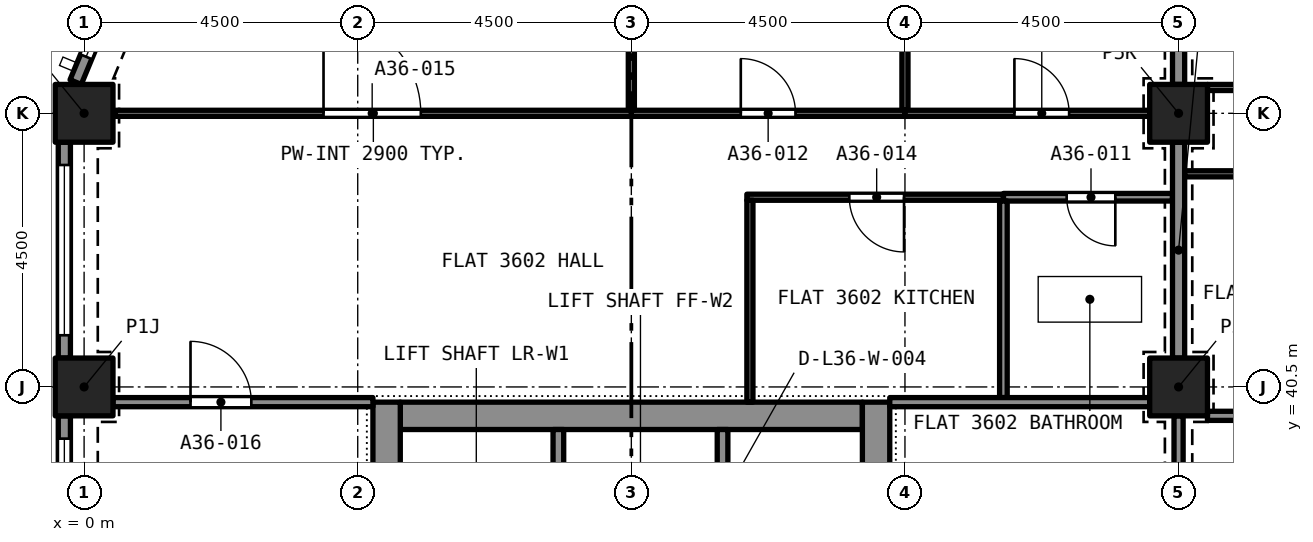
"""IFC4 building model, lengths in metres.
Left out: names, types, materials, properties, quantities, classifications, styles, units other than length and angle.
Written with IfcOpenShell. Run it as: python <this file> out.ifc"""

import sys

from ifc_helpers import new_model, si_unit, direction, frame, frame_2d, origin, origin_2d, place, context, subcontext, project, spatial, rectangle, extrude, element, fill, save


model = new_model("IFC4")
c1 = context("Model", 3, precision=1e-05, world=origin(), true_north=direction((0.0, 1.0)))
c2 = subcontext(c1, "Body", "Model", "MODEL_VIEW")
j1 = project(units=[si_unit("LENGTHUNIT", "METRE"), si_unit("PLANEANGLEUNIT", "RADIAN")], contexts=[c1])
p1 = place(None, origin())
s1 = spatial("IfcSite", under=j1, at=p1, CompositionType="ELEMENT")
p2 = place(p1, origin())
s2 = spatial("IfcBuilding", under=s1, at=p2, CompositionType="ELEMENT")
p3 = place(p2, frame((0.0, 0.0, 130.2)))
s3 = spatial("IfcBuildingStorey", under=s2, at=p3, CompositionType="ELEMENT", Elevation=130.2)
for number, where, z_axis, x_axis in (
    (1, (0.0, 40.5, 0.0), (0.0, 0.0, 1.0), (1.0, 0.0, 0.0)),
    (2, (18.0, 40.5, 0.0), (0.0, 0.0, 1.0), (1.0, 0.0, 0.0)),
    (3, (0.0, 45.0, 0.0), (0.0, 0.0, 1.0), (1.0, 0.0, 0.0)),
    (4, (18.0, 45.0, 0.0), (0.0, 0.0, 1.0), (1.0, 0.0, 0.0)),
):
    element("IfcColumn", number, at=place(p3, frame(where, z_axis=z_axis, x_axis=x_axis)), inside=s3, PredefinedType="COLUMN", context=c2, shape_type="SweptSolid", body=[
        extrude(rectangle(XDim=0.95, YDim=0.95, at=origin_2d()), origin(), (0.0, 0.0, 1.0), 3.2),
    ])
p4 = place(p3, frame((5.2, 40.025, 0.0), z_axis=(0.0, 0.0, 1.0), x_axis=(1.0, 0.0, 0.0)))
e5 = element("IfcWall", 5, at=p4, inside=s3, PredefinedType="SOLIDWALL", context=c2, shape_type="SweptSolid", body=[
    extrude(rectangle(XDim=7.6, YDim=0.45, at=frame_2d((3.8, 0.0))), origin(), (0.0, 0.0, 1.0), 3.2),
])
p5 = place(p3, frame((4.975, 27.25, 0.0), z_axis=(0.0, 0.0, 1.0), x_axis=(0.0, 1.0, 0.0)))
e6 = element("IfcWall", 6, at=p5, inside=s3, PredefinedType="SOLIDWALL", context=c2, shape_type="SweptSolid", body=[
    extrude(rectangle(XDim=13.0, YDim=0.45, at=frame_2d((6.5, 0.0))), origin(), (0.0, 0.0, 1.0), 3.2),
])
p6 = place(p5, frame((8.7, 0.0, 0.0)))
e7 = element("IfcOpeningElement", 7, at=p6, cuts=e6, PredefinedType="OPENING", context=c2, shape_type="SweptSolid", body=[
    extrude(rectangle(XDim=1.2, YDim=2.1, at=frame_2d((0.6, 1.05))), frame((0.0, 0.235, 0.0), z_axis=(0.0, -1.0, 0.0), x_axis=(1.0, 0.0, 0.0)), (0.0, 0.0, 1.0), 0.47),
])
p7 = place(p3, frame((13.025, 27.25, 0.0), z_axis=(0.0, 0.0, 1.0), x_axis=(0.0, 1.0, 0.0)))
e8 = element("IfcWall", 8, at=p7, inside=s3, PredefinedType="SOLIDWALL", context=c2, shape_type="SweptSolid", body=[
    extrude(rectangle(XDim=13.0, YDim=0.45, at=frame_2d((6.5, 0.0))), origin(), (0.0, 0.0, 1.0), 3.2),
])
p8 = place(p7, frame((10.85, 0.0, 0.0)))
e9 = element("IfcOpeningElement", 9, at=p8, cuts=e8, PredefinedType="OPENING", context=c2, shape_type="SweptSolid", body=[
    extrude(rectangle(XDim=1.1, YDim=2.1, at=frame_2d((0.55, 1.05))), frame((0.0, 0.235, 0.0), z_axis=(0.0, -1.0, 0.0), x_axis=(1.0, 0.0, 0.0)), (0.0, 0.0, 1.0), 0.47),
])
p9 = place(p7, frame((8.7, 0.0, 0.0)))
e10 = element("IfcOpeningElement", 10, at=p9, cuts=e8, PredefinedType="OPENING", context=c2, shape_type="SweptSolid", body=[
    extrude(rectangle(XDim=1.2, YDim=2.1, at=frame_2d((0.6, 1.05))), frame((0.0, 0.235, 0.0), z_axis=(0.0, -1.0, 0.0), x_axis=(1.0, 0.0, 0.0)), (0.0, 0.0, 1.0), 0.47),
])
p10 = place(p3, frame((-0.139, 45.513, 0.0), z_axis=(0.0, 0.0, 1.0), x_axis=(0.382680855588, 0.923880599843, 0.0)))
e11 = element("IfcWall", 11, at=p10, inside=s3, PredefinedType="SOLIDWALL", context=c2, shape_type="SweptSolid", body=[
    extrude(rectangle(XDim=2.403, YDim=0.2, at=frame_2d((1.201, 0.0))), origin(), (0.0, 0.0, 1.0), 3.2),
])
p11 = place(p10, frame((0.451, 0.0, 0.45)))
e12 = element("IfcOpeningElement", 12, at=p11, cuts=e11, PredefinedType="OPENING", context=c2, shape_type="SweptSolid", body=[
    extrude(rectangle(XDim=1.7, YDim=1.95, at=frame_2d((0.85, 0.975))), frame((0.0, 0.11, 0.0), z_axis=(0.0, -1.0, 0.0), x_axis=(1.0, 0.0, 0.0)), (0.0, 0.0, 1.0), 0.22),
])
p12 = place(p3, frame((-0.325, 40.975, 0.0), z_axis=(0.0, 0.0, 1.0), x_axis=(0.0, 1.0, 0.0)))
e13 = element("IfcWall", 13, at=p12, inside=s3, PredefinedType="SOLIDWALL", context=c2, shape_type="SweptSolid", body=[
    extrude(rectangle(XDim=3.55, YDim=0.2, at=frame_2d((1.775, 0.0))), origin(), (0.0, 0.0, 1.0), 3.2),
])
p13 = place(p12, frame((0.375, 0.0, 0.45)))
e14 = element("IfcOpeningElement", 14, at=p13, cuts=e13, PredefinedType="OPENING", context=c2, shape_type="SweptSolid", body=[
    extrude(rectangle(XDim=2.8, YDim=1.95, at=frame_2d((1.4, 0.975))), frame((0.0, 0.11, 0.0), z_axis=(0.0, -1.0, 0.0), x_axis=(1.0, 0.0, 0.0)), (0.0, 0.0, 1.0), 0.22),
])
p14 = place(p3, frame((-0.325, 36.475, 0.0), z_axis=(0.0, 0.0, 1.0), x_axis=(0.0, 1.0, 0.0)))
e15 = element("IfcWall", 15, at=p14, inside=s3, PredefinedType="SOLIDWALL", context=c2, shape_type="SweptSolid", body=[
    extrude(rectangle(XDim=3.55, YDim=0.2, at=frame_2d((1.775, 0.0))), origin(), (0.0, 0.0, 1.0), 3.2),
])
p15 = place(p14, frame((0.375, 0.0, 0.45)))
e16 = element("IfcOpeningElement", 16, at=p15, cuts=e15, PredefinedType="OPENING", context=c2, shape_type="SweptSolid", body=[
    extrude(rectangle(XDim=2.8, YDim=1.95, at=frame_2d((1.4, 0.975))), frame((0.0, 0.11, 0.0), z_axis=(0.0, -1.0, 0.0), x_axis=(1.0, 0.0, 0.0)), (0.0, 0.0, 1.0), 0.22),
])
p16 = place(p3, frame((17.9, 43.62, 0.0), z_axis=(0.0, 0.0, 1.0), x_axis=(-1.0, 0.0, 0.0)))
e17 = element("IfcWall", 17, at=p16, inside=s3, PredefinedType="PARTITIONING", context=c2, shape_type="SweptSolid", body=[
    extrude(rectangle(XDim=2.781, YDim=0.125, at=frame_2d((1.39, 0.0))), origin(), (0.0, 0.0, 1.0), 2.9),
])
p17 = place(p16, frame((0.94, 0.0, 0.0)))
e18 = element("IfcOpeningElement", 18, at=p17, cuts=e17, PredefinedType="OPENING", context=c2, shape_type="SweptSolid", body=[
    extrude(rectangle(XDim=0.8, YDim=2.1, at=frame_2d((0.4, 1.05))), frame((0.0, 0.073, 0.0), z_axis=(0.0, -1.0, 0.0), x_axis=(1.0, 0.0, 0.0)), (0.0, 0.0, 1.0), 0.145),
])
p18 = place(p3, frame((15.119, 40.325, 0.0), z_axis=(0.0, 0.0, 1.0), x_axis=(0.0, 1.0, 0.0)))
e19 = element("IfcWall", 19, at=p18, inside=s3, PredefinedType="PARTITIONING", context=c2, shape_type="SweptSolid", body=[
    extrude(rectangle(XDim=3.233, YDim=0.125, at=frame_2d((1.616, 0.0))), origin(), (0.0, 0.0, 1.0), 2.9),
])
p19 = place(p3, frame((18.0, 40.975, 0.0), z_axis=(0.0, 0.0, 1.0), x_axis=(0.0, 1.0, 0.0)))
e20 = element("IfcWall", 20, at=p19, inside=s3, PredefinedType="PARTITIONING", context=c2, shape_type="SweptSolid", body=[
    extrude(rectangle(XDim=3.55, YDim=0.2, at=frame_2d((1.775, 0.0))), origin(), (0.0, 0.0, 1.0), 2.38),
])
p20 = place(p3, frame((13.5, 45.05, 0.0), z_axis=(0.0, 0.0, 1.0), x_axis=(0.0, 1.0, 0.0)))
e21 = element("IfcWall", 21, at=p20, inside=s3, PredefinedType="PARTITIONING", context=c2, shape_type="SweptSolid", body=[
    extrude(rectangle(XDim=3.975, YDim=0.1, at=frame_2d((1.987, 0.0))), origin(), (0.0, 0.0, 1.0), 2.9),
])
p21 = place(p3, frame((9.0, 45.0, 0.0), z_axis=(0.0, 0.0, 1.0), x_axis=(1.0, 0.0, 0.0)))
e22 = element("IfcWall", 22, at=p21, inside=s3, PredefinedType="PARTITIONING", context=c2, shape_type="SweptSolid", body=[
    extrude(rectangle(XDim=4.5, YDim=0.1, at=frame_2d((2.25, 0.0))), origin(), (0.0, 0.0, 1.0), 2.9),
])
p22 = place(p21, frame((1.8, 0.0, 0.0)))
e23 = element("IfcOpeningElement", 23, at=p22, cuts=e22, PredefinedType="OPENING", context=c2, shape_type="SweptSolid", body=[
    extrude(rectangle(XDim=0.9, YDim=2.1, at=frame_2d((0.45, 1.05))), frame((0.0, 0.06, 0.0), z_axis=(0.0, -1.0, 0.0), x_axis=(1.0, 0.0, 0.0)), (0.0, 0.0, 1.0), 0.12),
])
p23 = place(p3, frame((9.0, 45.05, 0.0), z_axis=(0.0, 0.0, 1.0), x_axis=(0.0, 1.0, 0.0)))
e24 = element("IfcWall", 24, at=p23, inside=s3, PredefinedType="PARTITIONING", context=c2, shape_type="SweptSolid", body=[
    extrude(rectangle(XDim=3.975, YDim=0.1, at=frame_2d((1.987, 0.0))), origin(), (0.0, 0.0, 1.0), 2.9),
])
p24 = place(p3, frame((13.5, 45.0, 0.0), z_axis=(0.0, 0.0, 1.0), x_axis=(1.0, 0.0, 0.0)))
e25 = element("IfcWall", 25, at=p24, inside=s3, PredefinedType="PARTITIONING", context=c2, shape_type="SweptSolid", body=[
    extrude(rectangle(XDim=4.025, YDim=0.1, at=frame_2d((2.012, 0.0))), origin(), (0.0, 0.0, 1.0), 2.9),
])
p25 = place(p24, frame((1.8, 0.0, 0.0)))
e26 = element("IfcOpeningElement", 26, at=p25, cuts=e25, PredefinedType="OPENING", context=c2, shape_type="SweptSolid", body=[
    extrude(rectangle(XDim=0.9, YDim=2.1, at=frame_2d((0.45, 1.05))), frame((0.0, 0.06, 0.0), z_axis=(0.0, -1.0, 0.0), x_axis=(1.0, 0.0, 0.0)), (0.0, 0.0, 1.0), 0.12),
])
p26 = place(p3, frame((18.0, 45.475, 0.0), z_axis=(0.0, 0.0, 1.0), x_axis=(0.0, 1.0, 0.0)))
e27 = element("IfcWall", 27, at=p26, inside=s3, PredefinedType="PARTITIONING", context=c2, shape_type="SweptSolid", body=[
    extrude(rectangle(XDim=3.55, YDim=0.2, at=frame_2d((1.775, 0.0))), origin(), (0.0, 0.0, 1.0), 2.38),
])
p27 = place(p3, frame((15.119, 43.62, 0.0), z_axis=(0.0, 0.0, 1.0), x_axis=(-1.0, 0.0, 0.0)))
e28 = element("IfcWall", 28, at=p27, inside=s3, PredefinedType="PARTITIONING", context=c2, shape_type="SweptSolid", body=[
    extrude(rectangle(XDim=4.219, YDim=0.1, at=frame_2d((2.11, 0.0))), origin(), (0.0, 0.0, 1.0), 2.9),
])
p28 = place(p27, frame((1.635, 0.0, 0.0)))
e29 = element("IfcOpeningElement", 29, at=p28, cuts=e28, PredefinedType="OPENING", context=c2, shape_type="SweptSolid", body=[
    extrude(rectangle(XDim=0.9, YDim=2.1, at=frame_2d((0.45, 1.05))), frame((0.0, 0.06, 0.0), z_axis=(0.0, -1.0, 0.0), x_axis=(1.0, 0.0, 0.0)), (0.0, 0.0, 1.0), 0.12),
])
p29 = place(p3, frame((10.95, 40.25, 0.0), z_axis=(0.0, 0.0, 1.0), x_axis=(0.0, 1.0, 0.0)))
e30 = element("IfcWall", 30, at=p29, inside=s3, PredefinedType="PARTITIONING", context=c2, shape_type="SweptSolid", body=[
    extrude(rectangle(XDim=3.32, YDim=0.1, at=frame_2d((1.66, 0.0))), origin(), (0.0, 0.0, 1.0), 2.9),
])
p30 = place(p3, frame((0.514, 45.0, 0.0), z_axis=(0.0, 0.0, 1.0), x_axis=(1.0, 0.0, 0.0)))
e31 = element("IfcWall", 31, at=p30, inside=s3, PredefinedType="PARTITIONING", context=c2, shape_type="SweptSolid", body=[
    extrude(rectangle(XDim=8.486, YDim=0.1, at=frame_2d((4.243, 0.0))), origin(), (0.0, 0.0, 1.0), 2.9),
])
p31 = place(p30, frame((3.423, 0.0, 0.0)))
e32 = element("IfcOpeningElement", 32, at=p31, cuts=e31, PredefinedType="OPENING", context=c2, shape_type="SweptSolid", body=[
    extrude(rectangle(XDim=1.6, YDim=2.1, at=frame_2d((0.8, 1.05))), frame((0.0, 0.06, 0.0), z_axis=(0.0, -1.0, 0.0), x_axis=(1.0, 0.0, 0.0)), (0.0, 0.0, 1.0), 0.12),
])
p32 = place(p3, frame((0.475, 40.25, 0.0), z_axis=(0.0, 0.0, 1.0), x_axis=(1.0, 0.0, 0.0)))
e33 = element("IfcWall", 33, at=p32, inside=s3, PredefinedType="PARTITIONING", context=c2, shape_type="SweptSolid", body=[
    extrude(rectangle(XDim=4.275, YDim=0.15, at=frame_2d((2.137, 0.0))), origin(), (0.0, 0.0, 1.0), 2.9),
])
p33 = place(p32, frame((1.275, 0.0, 0.0)))
e34 = element("IfcOpeningElement", 34, at=p33, cuts=e33, PredefinedType="OPENING", context=c2, shape_type="SweptSolid", body=[
    extrude(rectangle(XDim=1.0, YDim=2.1, at=frame_2d((0.5, 1.05))), frame((0.0, 0.085, 0.0), z_axis=(0.0, -1.0, 0.0), x_axis=(1.0, 0.0, 0.0)), (0.0, 0.0, 1.0), 0.17),
])
p34 = place(p3, frame((13.25, 40.25, 0.0), z_axis=(0.0, 0.0, 1.0), x_axis=(1.0, 0.0, 0.0)))
e35 = element("IfcWall", 35, at=p34, inside=s3, PredefinedType="PARTITIONING", context=c2, shape_type="SweptSolid", body=[
    extrude(rectangle(XDim=4.275, YDim=0.15, at=frame_2d((2.137, 0.0))), origin(), (0.0, 0.0, 1.0), 2.9),
])
p35 = place(p3, frame((21.24, 44.005, 0.0), z_axis=(0.0, 0.0, 1.0), x_axis=(-1.0, 0.0, 0.0)))
e36 = element("IfcWall", 36, at=p35, inside=s3, PredefinedType="PARTITIONING", context=c2, shape_type="SweptSolid", body=[
    extrude(rectangle(XDim=3.14, YDim=0.1, at=frame_2d((1.57, 0.0))), origin(), (0.0, 0.0, 1.0), 2.75),
])
p36 = place(p35, frame((1.17, 0.0, 0.0)))
e37 = element("IfcOpeningElement", 37, at=p36, cuts=e36, PredefinedType="OPENING", context=c2, shape_type="SweptSolid", body=[
    extrude(rectangle(XDim=0.9, YDim=2.1, at=frame_2d((0.45, 1.05))), frame((0.0, 0.06, 0.0), z_axis=(0.0, -1.0, 0.0), x_axis=(1.0, 0.0, 0.0)), (0.0, 0.0, 1.0), 0.12),
])
p37 = place(p3, frame((18.475, 45.425, 0.0), z_axis=(0.0, 0.0, 1.0), x_axis=(1.0, 0.0, 0.0)))
e38 = element("IfcWall", 38, at=p37, inside=s3, PredefinedType="PARTITIONING", context=c2, shape_type="SweptSolid", body=[
    extrude(rectangle(XDim=4.025, YDim=0.1, at=frame_2d((2.012, 0.0))), origin(), (0.0, 0.0, 1.0), 2.75),
])
p38 = place(p37, frame((1.275, 0.0, 0.0)))
e39 = element("IfcOpeningElement", 39, at=p38, cuts=e38, PredefinedType="OPENING", context=c2, shape_type="SweptSolid", body=[
    extrude(rectangle(XDim=1.0, YDim=2.1, at=frame_2d((0.5, 1.05))), frame((0.0, 0.06, 0.0), z_axis=(0.0, -1.0, 0.0), x_axis=(1.0, 0.0, 0.0)), (0.0, 0.0, 1.0), 0.12),
])
p39 = place(p3, frame((18.475, 40.025, 0.0), z_axis=(0.0, 0.0, 1.0), x_axis=(1.0, 0.0, 0.0)))
e40 = element("IfcWall", 40, at=p39, inside=s3, PredefinedType="PARTITIONING", context=c2, shape_type="SweptSolid", body=[
    extrude(rectangle(XDim=9.05, YDim=0.15, at=frame_2d((4.525, 0.0))), origin(), (0.0, 0.0, 1.0), 2.75),
])
p40 = place(p3, frame((18.0, 40.025, 0.0), z_axis=(0.0, 0.0, 1.0), x_axis=(0.0, -1.0, 0.0)))
e41 = element("IfcWall", 41, at=p40, inside=s3, PredefinedType="PARTITIONING", context=c2, shape_type="SweptSolid", body=[
    extrude(rectangle(XDim=3.55, YDim=0.15, at=frame_2d((1.775, 0.0))), origin(), (0.0, 0.0, 1.0), 2.38),
])
p41 = place(p40, frame((1.175, 0.0, 0.0)))
e42 = element("IfcOpeningElement", 42, at=p41, cuts=e41, PredefinedType="OPENING", context=c2, shape_type="SweptSolid", body=[
    extrude(rectangle(XDim=1.2, YDim=2.1, at=frame_2d((0.6, 1.05))), frame((0.0, 0.085, 0.0), z_axis=(0.0, -1.0, 0.0), x_axis=(1.0, 0.0, 0.0)), (0.0, 0.0, 1.0), 0.17),
])
p42 = place(p3, frame((7.8, 37.5, 0.0), z_axis=(0.0, 0.0, 1.0), x_axis=(0.0, 1.0, 0.0)))
e43 = element("IfcWall", 43, at=p42, inside=s3, PredefinedType="SOLIDWALL", context=c2, shape_type="SweptSolid", body=[
    extrude(rectangle(XDim=2.3, YDim=0.175, at=frame_2d((1.15, 0.0))), origin(), (0.0, 0.0, 1.0), 2.9),
])
p43 = place(p3, frame((10.5, 37.5, 0.0), z_axis=(0.0, 0.0, 1.0), x_axis=(0.0, 1.0, 0.0)))
e44 = element("IfcWall", 44, at=p43, inside=s3, PredefinedType="SOLIDWALL", context=c2, shape_type="SweptSolid", body=[
    extrude(rectangle(XDim=2.3, YDim=0.175, at=frame_2d((1.15, 0.0))), origin(), (0.0, 0.0, 1.0), 2.9),
])
p44 = place(p43, frame((0.65, 0.0, 0.0)))
e45 = element("IfcOpeningElement", 45, at=p44, cuts=e44, PredefinedType="OPENING", context=c2, shape_type="SweptSolid", body=[
    extrude(rectangle(XDim=1.0, YDim=2.1, at=frame_2d((0.5, 1.05))), frame((0.0, 0.097, 0.0), z_axis=(0.0, -1.0, 0.0), x_axis=(1.0, 0.0, 0.0)), (0.0, 0.0, 1.0), 0.195),
])
p45 = place(p11, origin())
e46 = element("IfcWindow", 46, at=p45, inside=s3, PartitioningType="SINGLE_PANEL", PredefinedType="WINDOW", context=c2, shape_type="SweptSolid", body=[
    extrude(rectangle(XDim=1.7, YDim=1.95, at=frame_2d((0.85, 0.975))), frame((0.0, 0.03, 0.0), z_axis=(0.0, -1.0, 0.0), x_axis=(1.0, 0.0, 0.0)), (0.0, 0.0, 1.0), 0.06),
])
fill(e12, e46)
p46 = place(p13, origin())
e47 = element("IfcWindow", 47, at=p46, inside=s3, PartitioningType="SINGLE_PANEL", PredefinedType="WINDOW", context=c2, shape_type="SweptSolid", body=[
    extrude(rectangle(XDim=2.8, YDim=1.95, at=frame_2d((1.4, 0.975))), frame((0.0, 0.03, 0.0), z_axis=(0.0, -1.0, 0.0), x_axis=(1.0, 0.0, 0.0)), (0.0, 0.0, 1.0), 0.06),
])
fill(e14, e47)
p47 = place(p15, origin())
e48 = element("IfcWindow", 48, at=p47, inside=s3, PartitioningType="SINGLE_PANEL", PredefinedType="WINDOW", context=c2, shape_type="SweptSolid", body=[
    extrude(rectangle(XDim=2.8, YDim=1.95, at=frame_2d((1.4, 0.975))), frame((0.0, 0.03, 0.0), z_axis=(0.0, -1.0, 0.0), x_axis=(1.0, 0.0, 0.0)), (0.0, 0.0, 1.0), 0.06),
])
fill(e16, e48)
p48 = place(p17, origin())
e49 = element("IfcDoor", 49, at=p48, inside=s3, OperationType="SINGLE_SWING_LEFT", PredefinedType="DOOR", context=c2, shape_type="SweptSolid", body=[
    extrude(rectangle(XDim=0.8, YDim=2.1, at=frame_2d((0.4, 1.05))), frame((0.0, 0.025, 0.0), z_axis=(0.0, -1.0, 0.0), x_axis=(1.0, 0.0, 0.0)), (0.0, 0.0, 1.0), 0.05),
])
fill(e18, e49)
p49 = place(p22, origin())
e50 = element("IfcDoor", 50, at=p49, inside=s3, OperationType="SINGLE_SWING_LEFT", PredefinedType="DOOR", context=c2, shape_type="SweptSolid", body=[
    extrude(rectangle(XDim=0.9, YDim=2.1, at=frame_2d((0.45, 1.05))), frame((0.0, 0.025, 0.0), z_axis=(0.0, -1.0, 0.0), x_axis=(1.0, 0.0, 0.0)), (0.0, 0.0, 1.0), 0.05),
])
fill(e23, e50)
p50 = place(p25, origin())
e51 = element("IfcDoor", 51, at=p50, inside=s3, OperationType="SINGLE_SWING_RIGHT", PredefinedType="DOOR", context=c2, shape_type="SweptSolid", body=[
    extrude(rectangle(XDim=0.9, YDim=2.1, at=frame_2d((0.45, 1.05))), frame((0.0, 0.025, 0.0), z_axis=(0.0, -1.0, 0.0), x_axis=(1.0, 0.0, 0.0)), (0.0, 0.0, 1.0), 0.05),
])
fill(e26, e51)
p51 = place(p28, origin())
e52 = element("IfcDoor", 52, at=p51, inside=s3, OperationType="SINGLE_SWING_LEFT", PredefinedType="DOOR", context=c2, shape_type="SweptSolid", body=[
    extrude(rectangle(XDim=0.9, YDim=2.1, at=frame_2d((0.45, 1.05))), frame((0.0, 0.025, 0.0), z_axis=(0.0, -1.0, 0.0), x_axis=(1.0, 0.0, 0.0)), (0.0, 0.0, 1.0), 0.05),
])
fill(e29, e52)
p52 = place(p31, origin())
e53 = element("IfcDoor", 53, at=p52, inside=s3, OperationType="SINGLE_SWING_LEFT", PredefinedType="DOOR", context=c2, shape_type="SweptSolid", body=[
    extrude(rectangle(XDim=1.6, YDim=2.1, at=frame_2d((0.8, 1.05))), frame((0.0, 0.025, 0.0), z_axis=(0.0, -1.0, 0.0), x_axis=(1.0, 0.0, 0.0)), (0.0, 0.0, 1.0), 0.05),
])
fill(e32, e53)
p53 = place(p33, origin())
e54 = element("IfcDoor", 54, at=p53, inside=s3, OperationType="SINGLE_SWING_LEFT", PredefinedType="DOOR", context=c2, shape_type="SweptSolid", body=[
    extrude(rectangle(XDim=1.0, YDim=2.1, at=frame_2d((0.5, 1.05))), frame((0.0, 0.025, 0.0), z_axis=(0.0, -1.0, 0.0), x_axis=(1.0, 0.0, 0.0)), (0.0, 0.0, 1.0), 0.05),
])
fill(e34, e54)
save(model, sys.argv[1])
